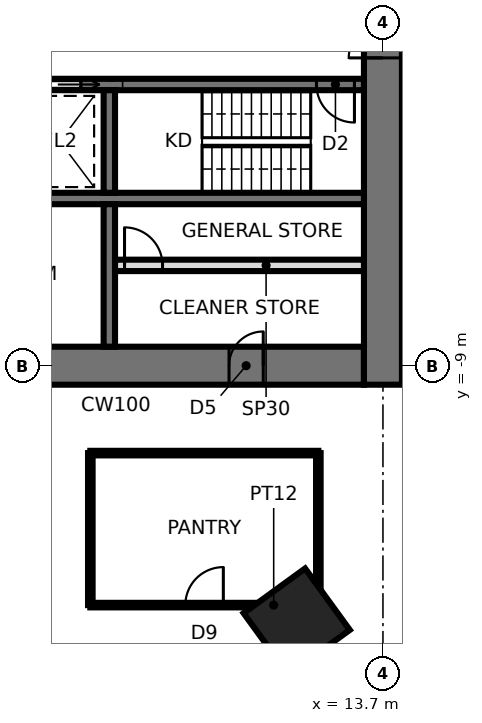
"""IFC4 building model, lengths in metres.
Left out: names, types, materials, properties, quantities, classifications, styles, units other than length and angle.
Written with IfcOpenShell. Run it as: python <this file> out.ifc"""

import sys

from ifc_helpers import new_model, si_unit, direction, frame, frame_2d, origin, origin_2d, place, context, subcontext, project, spatial, rectangle, extrude, element, fill, save


model = new_model("IFC4")
c1 = context("Model", 3, precision=1e-05, world=origin(), true_north=direction((0.0, 1.0)))
c2 = subcontext(c1, "Body", "Model", "MODEL_VIEW")
j1 = project(units=[si_unit("LENGTHUNIT", "METRE"), si_unit("PLANEANGLEUNIT", "RADIAN")], contexts=[c1])
p1 = place(None, origin())
s1 = spatial("IfcSite", under=j1, at=p1, CompositionType="ELEMENT")
p2 = place(p1, origin())
s2 = spatial("IfcBuilding", under=s1, at=p2, CompositionType="ELEMENT")
p3 = place(p2, frame((0.0, 0.0, 19.6)))
s3 = spatial("IfcBuildingStorey", under=s2, at=p3, CompositionType="ELEMENT", Elevation=19.6)
p4 = place(p3, frame((11.43, -15.733, 0.0), z_axis=(0.0, 0.0, 1.0), x_axis=(0.587785252292, -0.809016994375, 0.0)))
e1 = element("IfcColumn", 1, at=p4, inside=s3, PredefinedType="COLUMN", context=c2, shape_type="SweptSolid", body=[
    extrude(rectangle(XDim=2.0, YDim=2.0, at=origin_2d()), origin(), (0.0, 0.0, 1.0), 4.2),
])
p5 = place(p3, frame((-13.2, -9.0, 0.0), z_axis=(0.0, 0.0, 1.0), x_axis=(1.0, 0.0, 0.0)))
e2 = element("IfcWall", 2, at=p5, inside=s3, PredefinedType="SHEAR", context=c2, shape_type="SweptSolid", body=[
    extrude(rectangle(XDim=26.4, YDim=1.0, at=frame_2d((13.2, 0.0))), origin(), (0.0, 0.0, 1.0), 4.2),
])
p6 = place(p5, frame((2.65, 0.0, 0.0)))
e3 = element("IfcOpeningElement", 3, at=p6, cuts=e2, PredefinedType="OPENING", context=c2, shape_type="SweptSolid", body=[
    extrude(rectangle(XDim=0.9, YDim=2.1, at=frame_2d((0.45, 1.05))), frame((0.0, 0.51, 0.0), z_axis=(0.0, -1.0, 0.0), x_axis=(1.0, 0.0, 0.0)), (0.0, 0.0, 1.0), 1.02),
])
p7 = place(p5, frame((9.5, 0.0, 0.0)))
e4 = element("IfcOpeningElement", 4, at=p7, cuts=e2, PredefinedType="OPENING", context=c2, shape_type="SweptSolid", body=[
    extrude(rectangle(XDim=0.9, YDim=2.1, at=frame_2d((0.45, 1.05))), frame((0.0, 0.51, 0.0), z_axis=(0.0, -1.0, 0.0), x_axis=(1.0, 0.0, 0.0)), (0.0, 0.0, 1.0), 1.02),
])
p8 = place(p5, frame((16.0, 0.0, 0.0)))
e5 = element("IfcOpeningElement", 5, at=p8, cuts=e2, PredefinedType="OPENING", context=c2, shape_type="SweptSolid", body=[
    extrude(rectangle(XDim=0.9, YDim=2.1, at=frame_2d((0.45, 1.05))), frame((0.0, 0.51, 0.0), z_axis=(0.0, -1.0, 0.0), x_axis=(1.0, 0.0, 0.0)), (0.0, 0.0, 1.0), 1.02),
])
p9 = place(p5, frame((22.85, 0.0, 0.0)))
e6 = element("IfcOpeningElement", 6, at=p9, cuts=e2, PredefinedType="OPENING", context=c2, shape_type="SweptSolid", body=[
    extrude(rectangle(XDim=0.9, YDim=2.1, at=frame_2d((0.45, 1.05))), frame((0.0, 0.51, 0.0), z_axis=(0.0, -1.0, 0.0), x_axis=(1.0, 0.0, 0.0)), (0.0, 0.0, 1.0), 1.02),
])
p10 = place(p3, frame((13.7, -9.5, 0.0), z_axis=(0.0, 0.0, 1.0), x_axis=(0.0, 1.0, 0.0)))
e7 = element("IfcWall", 7, at=p10, inside=s3, PredefinedType="SHEAR", context=c2, shape_type="SweptSolid", body=[
    extrude(rectangle(XDim=19.0, YDim=1.0, at=frame_2d((9.5, 0.0))), origin(), (0.0, 0.0, 1.0), 4.2),
])
p11 = place(p10, frame((8.6, 0.0, 0.0)))
e8 = element("IfcOpeningElement", 8, at=p11, cuts=e7, PredefinedType="OPENING", context=c2, shape_type="SweptSolid", body=[
    extrude(rectangle(XDim=1.8, YDim=2.4, at=frame_2d((0.9, 1.2))), frame((0.0, 0.51, 0.0), z_axis=(0.0, -1.0, 0.0), x_axis=(1.0, 0.0, 0.0)), (0.0, 0.0, 1.0), 1.02),
])
p12 = place(p3, frame((-13.2, -1.6, 0.0), z_axis=(0.0, 0.0, 1.0), x_axis=(1.0, 0.0, 0.0)))
e9 = element("IfcWall", 9, at=p12, inside=s3, PredefinedType="SHEAR", context=c2, shape_type="SweptSolid", body=[
    extrude(rectangle(XDim=26.4, YDim=0.3, at=frame_2d((13.2, 0.0))), origin(), (0.0, 0.0, 1.0), 4.2),
])
p13 = place(p12, frame((25.15, 0.0, 0.0)))
e10 = element("IfcOpeningElement", 10, at=p13, cuts=e9, PredefinedType="OPENING", context=c2, shape_type="SweptSolid", body=[
    extrude(rectangle(XDim=1.0, YDim=2.1, at=frame_2d((0.5, 1.05))), frame((0.0, 0.16, 0.0), z_axis=(0.0, -1.0, 0.0), x_axis=(1.0, 0.0, 0.0)), (0.0, 0.0, 1.0), 0.32),
])
p14 = place(p12, frame((15.25, 0.0, 0.0)))
e11 = element("IfcOpeningElement", 11, at=p14, cuts=e9, PredefinedType="OPENING", context=c2, shape_type="SweptSolid", body=[
    extrude(rectangle(XDim=1.1, YDim=2.3, at=frame_2d((0.55, 1.15))), frame((0.0, 0.16, 0.0), z_axis=(0.0, -1.0, 0.0), x_axis=(1.0, 0.0, 0.0)), (0.0, 0.0, 1.0), 0.32),
])
p15 = place(p12, frame((17.85, 0.0, 0.0)))
e12 = element("IfcOpeningElement", 12, at=p15, cuts=e9, PredefinedType="OPENING", context=c2, shape_type="SweptSolid", body=[
    extrude(rectangle(XDim=1.1, YDim=2.3, at=frame_2d((0.55, 1.15))), frame((0.0, 0.16, 0.0), z_axis=(0.0, -1.0, 0.0), x_axis=(1.0, 0.0, 0.0)), (0.0, 0.0, 1.0), 0.32),
])
p16 = place(p12, frame((5.55, 0.0, 0.0)))
e13 = element("IfcOpeningElement", 13, at=p16, cuts=e9, PredefinedType="OPENING", context=c2, shape_type="SweptSolid", body=[
    extrude(rectangle(XDim=0.9, YDim=2.1, at=frame_2d((0.45, 1.05))), frame((0.0, 0.16, 0.0), z_axis=(0.0, -1.0, 0.0), x_axis=(1.0, 0.0, 0.0)), (0.0, 0.0, 1.0), 0.32),
])
p17 = place(p3, frame((-13.2, -4.6, 0.0), z_axis=(0.0, 0.0, 1.0), x_axis=(1.0, 0.0, 0.0)))
e14 = element("IfcWall", 14, at=p17, inside=s3, PredefinedType="SHEAR", context=c2, shape_type="SweptSolid", body=[
    extrude(rectangle(XDim=26.4, YDim=0.3, at=frame_2d((13.2, 0.0))), origin(), (0.0, 0.0, 1.0), 4.2),
])
p18 = place(p3, frame((6.5, -1.75, 0.0), z_axis=(0.0, 0.0, 1.0), x_axis=(0.0, -1.0, 0.0)))
e15 = element("IfcWall", 15, at=p18, inside=s3, PredefinedType="SHEAR", context=c2, shape_type="SweptSolid", body=[
    extrude(rectangle(XDim=2.7, YDim=0.3, at=frame_2d((1.35, 0.0))), origin(), (0.0, 0.0, 1.0), 4.2),
])
p19 = place(p3, frame((6.5, -4.75, 0.0), z_axis=(0.0, 0.0, 1.0), x_axis=(0.0, -1.0, 0.0)))
e16 = element("IfcWall", 16, at=p19, inside=s3, PredefinedType="SHEAR", context=c2, shape_type="SweptSolid", body=[
    extrude(rectangle(XDim=3.75, YDim=0.3, at=frame_2d((1.875, 0.0))), origin(), (0.0, 0.0, 1.0), 4.2),
])
p20 = place(p3, frame((6.65, -6.36, 0.0), z_axis=(0.0, 0.0, 1.0), x_axis=(1.0, 0.0, 0.0)))
e17 = element("IfcWall", 17, at=p20, inside=s3, PredefinedType="PARTITIONING", context=c2, shape_type="SweptSolid", body=[
    extrude(rectangle(XDim=6.55, YDim=0.3, at=frame_2d((3.275, 0.0))), origin(), (0.0, 0.0, 1.0), 4.04),
])
p21 = place(p20, frame((0.25, 0.0, 0.0)))
e18 = element("IfcOpeningElement", 18, at=p21, cuts=e17, PredefinedType="OPENING", context=c2, shape_type="SweptSolid", body=[
    extrude(rectangle(XDim=1.0, YDim=2.4, at=frame_2d((0.5, 1.2))), frame((0.0, 0.16, 0.0), z_axis=(0.0, -1.0, 0.0), x_axis=(1.0, 0.0, 0.0)), (0.0, 0.0, 1.0), 0.32),
])
p22 = place(p3, frame((6.0, -15.3, 0.0), z_axis=(0.0, 0.0, 1.0), x_axis=(0.0, 1.0, 0.0)))
e19 = element("IfcWall", 19, at=p22, inside=s3, PredefinedType="PARTITIONING", context=c2, shape_type="SweptSolid", body=[
    extrude(rectangle(XDim=4.0, YDim=0.12, at=frame_2d((2.0, 0.0))), origin(), (0.0, 0.0, 1.0), 4.04),
])
p23 = place(p3, frame((12.0, -15.3, 0.0), z_axis=(0.0, 0.0, 1.0), x_axis=(-1.0, 0.0, 0.0)))
e20 = element("IfcWall", 20, at=p23, inside=s3, PredefinedType="PARTITIONING", context=c2, shape_type="SweptSolid", body=[
    extrude(rectangle(XDim=6.0, YDim=0.12, at=frame_2d((3.0, 0.0))), origin(), (0.0, 0.0, 1.0), 4.04),
])
p24 = place(p23, frame((2.5, 0.0, 0.0)))
e21 = element("IfcOpeningElement", 21, at=p24, cuts=e20, PredefinedType="OPENING", context=c2, shape_type="SweptSolid", body=[
    extrude(rectangle(XDim=1.0, YDim=2.4, at=frame_2d((0.5, 1.2))), frame((0.0, 0.07, 0.0), z_axis=(0.0, -1.0, 0.0), x_axis=(1.0, 0.0, 0.0)), (0.0, 0.0, 1.0), 0.14),
])
p25 = place(p3, frame((6.0, -11.3, 0.0), z_axis=(0.0, 0.0, 1.0), x_axis=(1.0, 0.0, 0.0)))
e22 = element("IfcWall", 22, at=p25, inside=s3, PredefinedType="PARTITIONING", context=c2, shape_type="SweptSolid", body=[
    extrude(rectangle(XDim=6.0, YDim=0.12, at=frame_2d((3.0, 0.0))), origin(), (0.0, 0.0, 1.0), 4.04),
])
p26 = place(p3, frame((12.0, -11.3, 0.0), z_axis=(0.0, 0.0, 1.0), x_axis=(0.0, -1.0, 0.0)))
e23 = element("IfcWall", 23, at=p26, inside=s3, PredefinedType="PARTITIONING", context=c2, shape_type="SweptSolid", body=[
    extrude(rectangle(XDim=4.0, YDim=0.12, at=frame_2d((2.0, 0.0))), origin(), (0.0, 0.0, 1.0), 4.04),
])
p27 = place(p11, origin())
e24 = element("IfcDoor", 24, at=p27, inside=s3, OperationType="DOUBLE_DOOR_SINGLE_SWING", PredefinedType="DOOR", context=c2, shape_type="SweptSolid", body=[
    extrude(rectangle(XDim=1.72, YDim=2.36, at=frame_2d((0.9, 1.18))), frame((0.0, 0.025, 0.0), z_axis=(0.0, -1.0, 0.0), x_axis=(1.0, 0.0, 0.0)), (0.0, 0.0, 1.0), 0.05),
    extrude(rectangle(XDim=0.04, YDim=2.4, at=frame_2d((0.02, 1.2))), frame((0.0, 0.25, 0.0), z_axis=(0.0, -1.0, 0.0), x_axis=(1.0, 0.0, 0.0)), (0.0, 0.0, 1.0), 0.5),
    extrude(rectangle(XDim=0.04, YDim=2.4, at=frame_2d((1.78, 1.2))), frame((0.0, 0.25, 0.0), z_axis=(0.0, -1.0, 0.0), x_axis=(1.0, 0.0, 0.0)), (0.0, 0.0, 1.0), 0.5),
    extrude(rectangle(XDim=1.72, YDim=0.04, at=frame_2d((0.9, 2.38))), frame((0.0, 0.25, 0.0), z_axis=(0.0, -1.0, 0.0), x_axis=(1.0, 0.0, 0.0)), (0.0, 0.0, 1.0), 0.5),
])
fill(e8, e24)
p28 = place(p13, frame((1.0, 0.0, 0.0), z_axis=(0.0, 0.0, 1.0), x_axis=(-1.0, 0.0, 0.0)))
e25 = element("IfcDoor", 25, at=p28, inside=s3, OperationType="SINGLE_SWING_LEFT", PredefinedType="DOOR", context=c2, shape_type="SweptSolid", body=[
    extrude(rectangle(XDim=1.0, YDim=2.1, at=frame_2d((0.5, 1.05))), frame((0.0, 0.025, 0.0), z_axis=(0.0, -1.0, 0.0), x_axis=(1.0, 0.0, 0.0)), (0.0, 0.0, 1.0), 0.05),
])
fill(e10, e25)
p29 = place(p15, frame((1.1, 0.0, 0.0), z_axis=(0.0, 0.0, 1.0), x_axis=(-1.0, 0.0, 0.0)))
e26 = element("IfcDoor", 26, at=p29, inside=s3, OperationType="SLIDING_TO_LEFT", PredefinedType="DOOR", context=c2, shape_type="SweptSolid", body=[
    extrude(rectangle(XDim=1.1, YDim=2.3, at=frame_2d((0.55, 1.15))), frame((0.0, 0.025, 0.0), z_axis=(0.0, -1.0, 0.0), x_axis=(1.0, 0.0, 0.0)), (0.0, 0.0, 1.0), 0.05),
])
fill(e12, e26)
p30 = place(p9, origin())
e27 = element("IfcDoor", 27, at=p30, inside=s3, OperationType="SINGLE_SWING_RIGHT", PredefinedType="DOOR", context=c2, shape_type="SweptSolid", body=[
    extrude(rectangle(XDim=0.82, YDim=2.06, at=frame_2d((0.45, 1.03))), frame((0.0, 0.025, 0.0), z_axis=(0.0, -1.0, 0.0), x_axis=(1.0, 0.0, 0.0)), (0.0, 0.0, 1.0), 0.05),
    extrude(rectangle(XDim=0.04, YDim=2.1, at=frame_2d((0.02, 1.05))), frame((0.0, 0.25, 0.0), z_axis=(0.0, -1.0, 0.0), x_axis=(1.0, 0.0, 0.0)), (0.0, 0.0, 1.0), 0.5),
    extrude(rectangle(XDim=0.04, YDim=2.1, at=frame_2d((0.88, 1.05))), frame((0.0, 0.25, 0.0), z_axis=(0.0, -1.0, 0.0), x_axis=(1.0, 0.0, 0.0)), (0.0, 0.0, 1.0), 0.5),
    extrude(rectangle(XDim=0.82, YDim=0.04, at=frame_2d((0.45, 2.08))), frame((0.0, 0.25, 0.0), z_axis=(0.0, -1.0, 0.0), x_axis=(1.0, 0.0, 0.0)), (0.0, 0.0, 1.0), 0.5),
])
fill(e6, e27)
p31 = place(p21, origin())
e28 = element("IfcDoor", 28, at=p31, inside=s3, OperationType="SINGLE_SWING_LEFT", PredefinedType="DOOR", context=c2, shape_type="SweptSolid", body=[
    extrude(rectangle(XDim=1.0, YDim=2.4, at=frame_2d((0.5, 1.2))), frame((0.0, 0.025, 0.0), z_axis=(0.0, -1.0, 0.0), x_axis=(1.0, 0.0, 0.0)), (0.0, 0.0, 1.0), 0.05),
])
fill(e18, e28)
p32 = place(p24, frame((1.0, 0.0, 0.0), z_axis=(0.0, 0.0, 1.0), x_axis=(-1.0, 0.0, 0.0)))
e29 = element("IfcDoor", 29, at=p32, inside=s3, OperationType="SINGLE_SWING_RIGHT", PredefinedType="DOOR", context=c2, shape_type="SweptSolid", body=[
    extrude(rectangle(XDim=1.0, YDim=2.4, at=frame_2d((0.5, 1.2))), frame((0.0, 0.025, 0.0), z_axis=(0.0, -1.0, 0.0), x_axis=(1.0, 0.0, 0.0)), (0.0, 0.0, 1.0), 0.05),
])
fill(e21, e29)
save(model, sys.argv[1])
